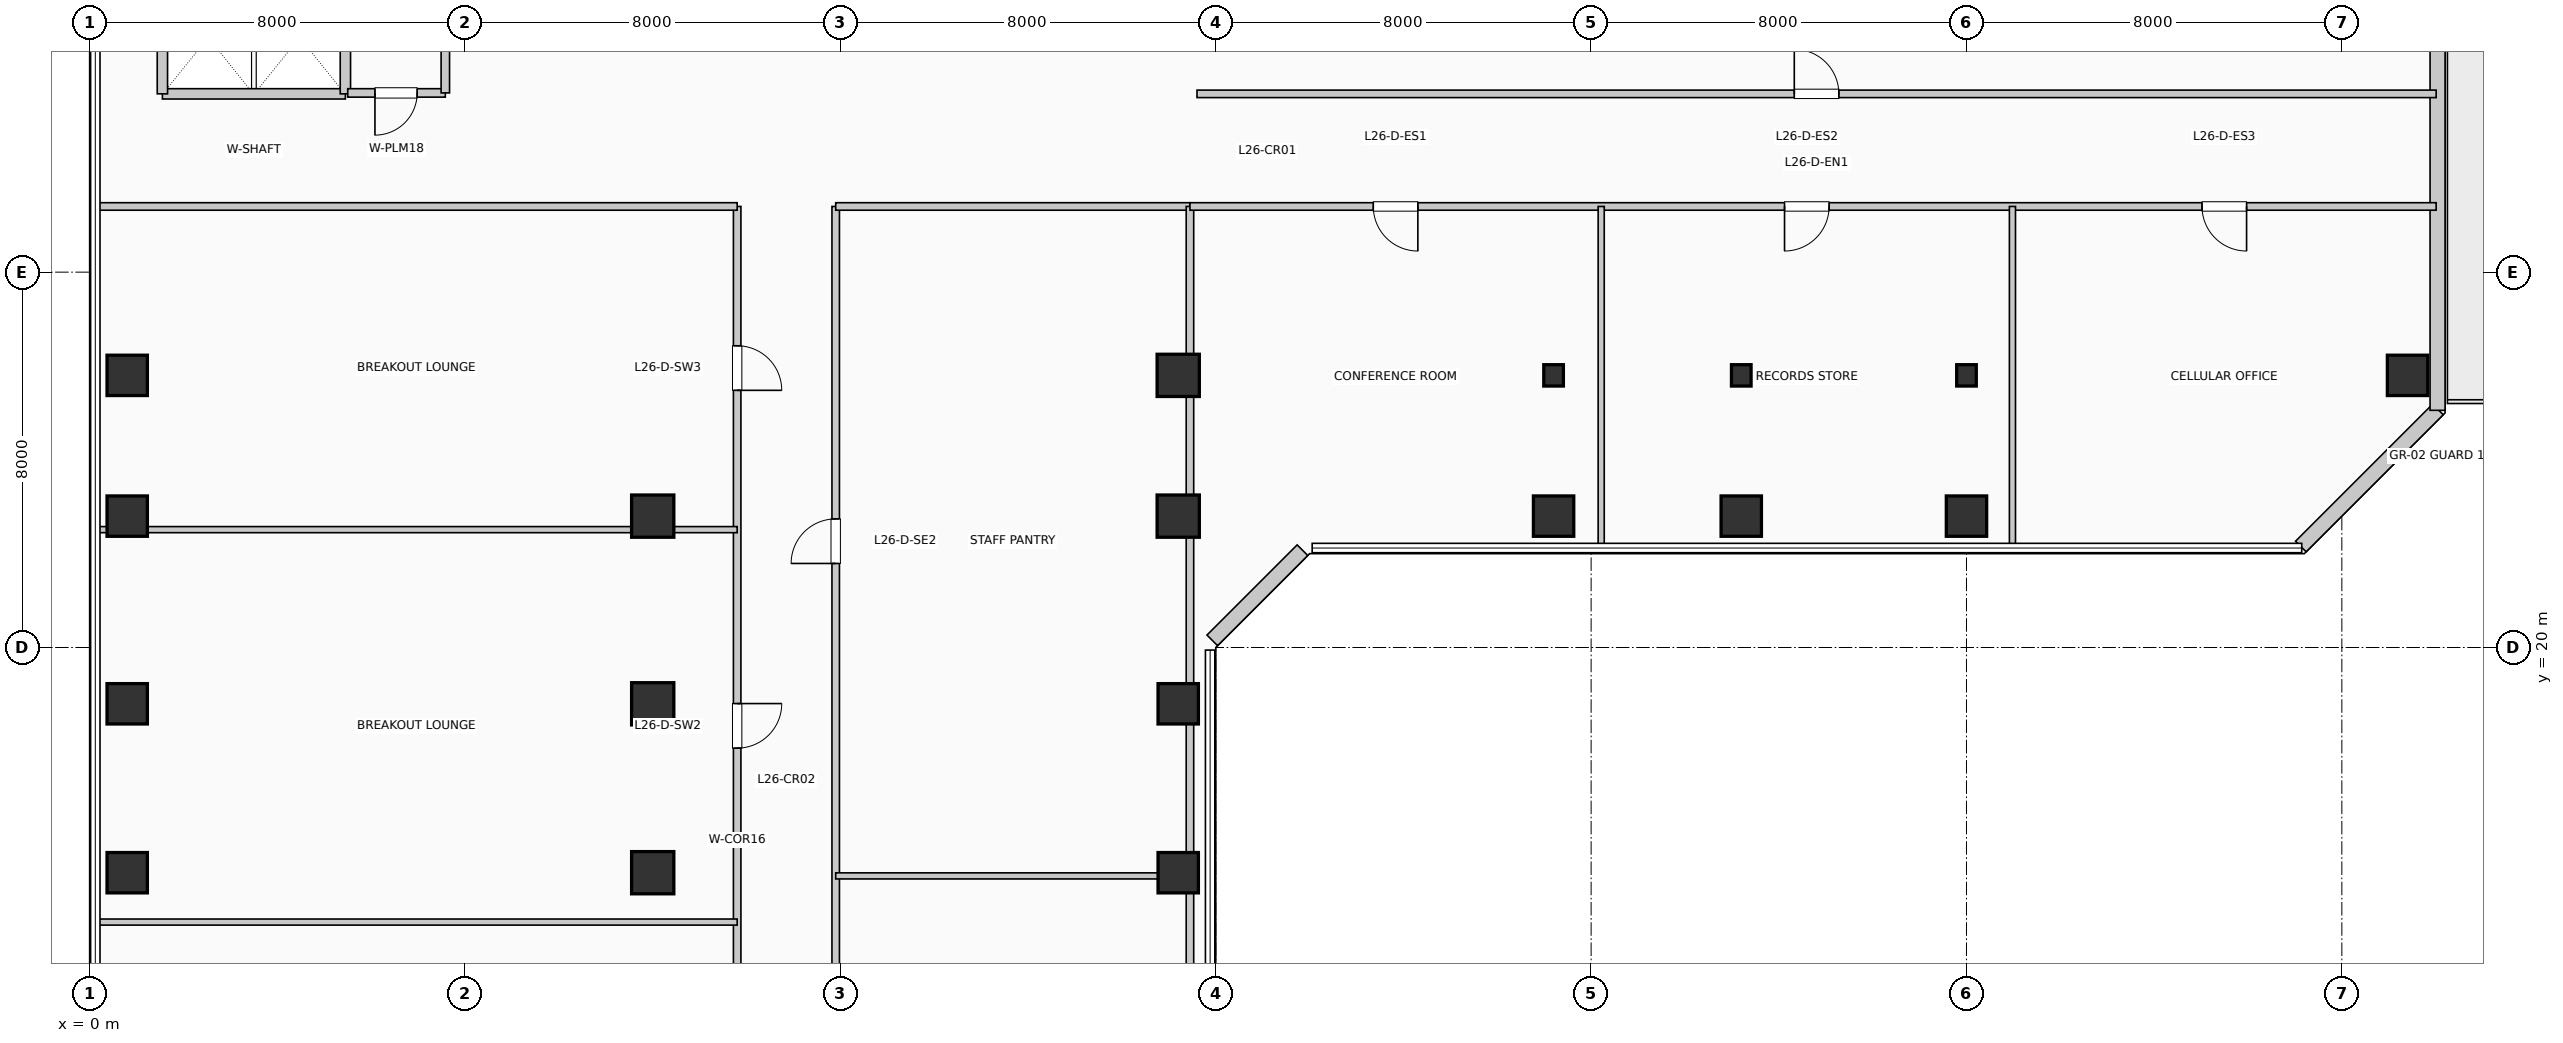
"""IFC4 building model, lengths in metres.
Left out: names, types, materials, properties, quantities, classifications, styles, units other than length and angle.
Written with IfcOpenShell. Run it as: python <this file> out.ifc"""

import sys

from ifc_helpers import new_model, si_unit, direction, frame, frame_2d, origin, origin_2d, place, context, subcontext, project, spatial, rectangle, i_section, extrude, element, fill, save


model = new_model("IFC4")
c1 = context("Model", 3, precision=1e-05, world=origin(), true_north=direction((0.0, 1.0)))
c2 = subcontext(c1, "Body", "Model", "MODEL_VIEW")
j1 = project(units=[si_unit("LENGTHUNIT", "METRE"), si_unit("PLANEANGLEUNIT", "RADIAN")], contexts=[c1])
p1 = place(None, origin())
s1 = spatial("IfcSite", under=j1, at=p1, CompositionType="ELEMENT")
p2 = place(p1, origin())
s2 = spatial("IfcBuilding", under=s1, at=p2, CompositionType="ELEMENT")
p3 = place(p2, frame((0.0, 0.0, 110.55)))
s3 = spatial("IfcBuildingStorey", under=s2, at=p3, CompositionType="ELEMENT", Elevation=110.55)
for number, where, z_axis, x_axis in (
    (1, (0.8, 15.2, 0.0), (0.0, 0.0, 1.0), (1.0, 0.0, 0.0)),
    (2, (0.8, 18.8, 0.0), (0.0, 0.0, 1.0), (1.0, 0.0, 0.0)),
    (3, (0.8, 22.8, 0.0), (0.0, 0.0, 1.0), (1.0, 0.0, 0.0)),
    (4, (0.8, 25.8, 0.0), (0.0, 0.0, 1.0), (1.0, 0.0, 0.0)),
):
    element("IfcColumn", number, at=place(p3, frame(where, z_axis=z_axis, x_axis=x_axis)), inside=s3, PredefinedType="COLUMN", context=c2, shape_type="SweptSolid", body=[
        extrude(rectangle(XDim=0.86, YDim=0.86, at=origin_2d()), origin(), (0.0, 0.0, 1.0), 3.96),
    ])
for number, where, z_axis, x_axis in (
    (5, (12.0, 15.2, 0.0), (0.0, 0.0, 1.0), (1.0, 0.0, 0.0)),
    (6, (12.0, 18.8, 0.0), (0.0, 0.0, 1.0), (1.0, 0.0, 0.0)),
    (7, (12.0, 22.8, 0.0), (0.0, 0.0, 1.0), (1.0, 0.0, 0.0)),
):
    element("IfcColumn", number, at=place(p3, frame(where, z_axis=z_axis, x_axis=x_axis)), inside=s3, PredefinedType="COLUMN", context=c2, shape_type="SweptSolid", body=[
        extrude(rectangle(XDim=0.9, YDim=0.9, at=origin_2d()), origin(), (0.0, 0.0, 1.0), 3.96),
    ])
for number, where, z_axis, x_axis in (
    (8, (23.2, 15.2, 0.0), (0.0, 0.0, 1.0), (1.0, 0.0, 0.0)),
    (9, (23.2, 18.8, 0.0), (0.0, 0.0, 1.0), (1.0, 0.0, 0.0)),
):
    element("IfcColumn", number, at=place(p3, frame(where, z_axis=z_axis, x_axis=x_axis)), inside=s3, PredefinedType="COLUMN", context=c2, shape_type="SweptSolid", body=[
        extrude(rectangle(XDim=0.86, YDim=0.86, at=origin_2d()), origin(), (0.0, 0.0, 1.0), 3.96),
    ])
for number, where, z_axis, x_axis in (
    (10, (23.2, 22.8, 0.0), (0.0, 0.0, 1.0), (1.0, 0.0, 0.0)),
    (11, (23.2, 25.8, 0.0), (0.0, 0.0, 1.0), (1.0, 0.0, 0.0)),
):
    element("IfcColumn", number, at=place(p3, frame(where, z_axis=z_axis, x_axis=x_axis)), inside=s3, PredefinedType="COLUMN", context=c2, shape_type="SweptSolid", body=[
        extrude(rectangle(XDim=0.9, YDim=0.9, at=origin_2d()), origin(), (0.0, 0.0, 1.0), 3.96),
    ])
p4 = place(p3, frame((31.2, 22.8, 0.0), z_axis=(0.0, 0.0, 1.0), x_axis=(1.0, 0.0, 0.0)))
e12 = element("IfcColumn", 12, at=p4, inside=s3, PredefinedType="COLUMN", context=c2, shape_type="SweptSolid", body=[
    extrude(rectangle(XDim=0.86, YDim=0.86, at=origin_2d()), origin(), (0.0, 0.0, 1.0), 3.96),
])
p5 = place(p3, frame((31.2, 25.8, 0.0), z_axis=(0.0, 0.0, 1.0), x_axis=(1.0, 0.0, 0.0)))
e13 = element("IfcColumn", 13, at=p5, inside=s3, PredefinedType="COLUMN", context=c2, shape_type="SweptSolid", body=[
    extrude(i_section(OverallWidth=0.418, OverallDepth=0.455, WebThickness=0.032, FlangeThickness=0.051, at=origin_2d()), origin(), (0.0, 0.0, 1.0), 3.96),
])
p6 = place(p3, frame((35.2, 22.8, 0.0), z_axis=(0.0, 0.0, 1.0), x_axis=(1.0, 0.0, 0.0)))
e14 = element("IfcColumn", 14, at=p6, inside=s3, PredefinedType="COLUMN", context=c2, shape_type="SweptSolid", body=[
    extrude(rectangle(XDim=0.86, YDim=0.86, at=origin_2d()), origin(), (0.0, 0.0, 1.0), 3.96),
])
p7 = place(p3, frame((35.2, 25.8, 0.0), z_axis=(0.0, 0.0, 1.0), x_axis=(1.0, 0.0, 0.0)))
e15 = element("IfcColumn", 15, at=p7, inside=s3, PredefinedType="COLUMN", context=c2, shape_type="SweptSolid", body=[
    extrude(i_section(OverallWidth=0.418, OverallDepth=0.455, WebThickness=0.032, FlangeThickness=0.051, at=origin_2d()), origin(), (0.0, 0.0, 1.0), 3.96),
])
p8 = place(p3, frame((40.0, 22.8, 0.0), z_axis=(0.0, 0.0, 1.0), x_axis=(1.0, 0.0, 0.0)))
e16 = element("IfcColumn", 16, at=p8, inside=s3, PredefinedType="COLUMN", context=c2, shape_type="SweptSolid", body=[
    extrude(rectangle(XDim=0.86, YDim=0.86, at=origin_2d()), origin(), (0.0, 0.0, 1.0), 3.96),
])
p9 = place(p3, frame((40.0, 25.8, 0.0), z_axis=(0.0, 0.0, 1.0), x_axis=(1.0, 0.0, 0.0)))
e17 = element("IfcColumn", 17, at=p9, inside=s3, PredefinedType="COLUMN", context=c2, shape_type="SweptSolid", body=[
    extrude(i_section(OverallWidth=0.418, OverallDepth=0.455, WebThickness=0.032, FlangeThickness=0.051, at=origin_2d()), origin(), (0.0, 0.0, 1.0), 3.96),
])
p10 = place(p3, frame((49.4, 25.8, 0.0), z_axis=(0.0, 0.0, 1.0), x_axis=(1.0, 0.0, 0.0)))
e18 = element("IfcColumn", 18, at=p10, inside=s3, PredefinedType="COLUMN", context=c2, shape_type="SweptSolid", body=[
    extrude(rectangle(XDim=0.86, YDim=0.86, at=origin_2d()), origin(), (0.0, 0.0, 1.0), 3.96),
])
p11 = place(p3, frame((23.926, 20.152, 0.0), z_axis=(0.0, 0.0, 1.0), x_axis=(0.707106781187, 0.707106781187, 0.0)))
e19 = element("IfcWall", 19, at=p11, inside=s3, PredefinedType="SOLIDWALL", context=c2, shape_type="SweptSolid", body=[
    extrude(rectangle(XDim=2.718, YDim=0.32, at=frame_2d((1.359, 0.0))), origin(), (0.0, 0.0, 1.0), 3.71),
])
p12 = place(p3, frame((47.126, 22.152, 0.0), z_axis=(0.0, 0.0, 1.0), x_axis=(0.707136318428, 0.707077242712, 0.0)))
e20 = element("IfcWall", 20, at=p12, inside=s3, PredefinedType="SOLIDWALL", context=c2, shape_type="SweptSolid", body=[
    extrude(rectangle(XDim=4.133, YDim=0.32, at=frame_2d((2.066, 0.0))), origin(), (0.0, 0.0, 1.0), 3.71),
])
p13 = place(p3, frame((50.04, 25.055, 0.0), z_axis=(0.0, 0.0, 1.0), x_axis=(0.0, 1.0, 0.0)))
e21 = element("IfcWall", 21, at=p13, inside=s3, PredefinedType="SOLIDWALL", context=c2, shape_type="SweptSolid", body=[
    extrude(rectangle(XDim=17.89, YDim=0.32, at=frame_2d((8.945, 0.0))), origin(), (0.0, 0.0, 1.0), 3.71),
])
p14 = place(p13, frame((13.381, 0.0, 0.0), z_axis=(0.0, 0.0, 1.0), x_axis=(-1.0, 0.0, 0.0)))
e22 = element("IfcOpeningElement", 22, at=p14, cuts=e21, PredefinedType="OPENING", context=c2, shape_type="SweptSolid", body=[
    extrude(rectangle(XDim=1.1, YDim=2.2, at=frame_2d((0.55, 1.1))), frame((0.0, 0.17, 0.0), z_axis=(0.0, -1.0, 0.0), x_axis=(1.0, 0.0, 0.0)), (0.0, 0.0, 1.0), 0.34),
])
p15 = place(p3, frame((1.55, 31.8, 0.0), z_axis=(0.0, 0.0, 1.0), x_axis=(1.0, 0.0, 0.0)))
e23 = element("IfcWall", 23, at=p15, inside=s3, PredefinedType="PARTITIONING", context=c2, shape_type="SweptSolid", body=[
    extrude(rectangle(XDim=3.9, YDim=0.22, at=frame_2d((1.95, 0.0))), origin(), (0.0, 0.0, 1.0), 3.71),
])
for number, where, z_axis, x_axis in (
    (24, (1.55, 31.8, 0.0), (0.0, 0.0, 1.0), (0.0, 1.0, 0.0)),
    (25, (5.45, 31.8, 0.0), (0.0, 0.0, 1.0), (0.0, 1.0, 0.0)),
):
    element("IfcWall", number, at=place(p3, frame(where, z_axis=z_axis, x_axis=x_axis)), inside=s3, PredefinedType="PARTITIONING", context=c2, shape_type="SweptSolid", body=[
        extrude(rectangle(XDim=2.38, YDim=0.22, at=frame_2d((1.19, 0.0))), origin(), (0.0, 0.0, 1.0), 3.71),
    ])
p16 = place(p3, frame((5.5, 31.82, 0.0), z_axis=(0.0, 0.0, 1.0), x_axis=(1.0, 0.0, 0.0)))
e26 = element("IfcWall", 26, at=p16, inside=s3, PredefinedType="PLUMBINGWALL", context=c2, shape_type="SweptSolid", body=[
    extrude(rectangle(XDim=2.08, YDim=0.18, at=frame_2d((1.04, 0.0))), origin(), (0.0, 0.0, 1.0), 3.71),
])
p17 = place(p16, frame((1.48, 0.0, 0.0), z_axis=(0.0, 0.0, 1.0), x_axis=(-1.0, 0.0, 0.0)))
e27 = element("IfcOpeningElement", 27, at=p17, cuts=e26, PredefinedType="OPENING", context=c2, shape_type="SweptSolid", body=[
    extrude(rectangle(XDim=0.9, YDim=2.1, at=frame_2d((0.45, 1.05))), frame((0.0, 0.1, 0.0), z_axis=(0.0, -1.0, 0.0), x_axis=(1.0, 0.0, 0.0)), (0.0, 0.0, 1.0), 0.2),
])
p18 = place(p3, frame((7.58, 31.82, 0.0), z_axis=(0.0, 0.0, 1.0), x_axis=(0.0, 1.0, 0.0)))
e28 = element("IfcWall", 28, at=p18, inside=s3, PredefinedType="PLUMBINGWALL", context=c2, shape_type="SweptSolid", body=[
    extrude(rectangle(XDim=2.36, YDim=0.18, at=frame_2d((1.18, 0.0))), origin(), (0.0, 0.0, 1.0), 3.71),
])
p19 = place(p3, frame((13.8, 4.8, 0.0), z_axis=(0.0, 0.0, 1.0), x_axis=(0.0, 1.0, 0.0)))
e29 = element("IfcWall", 29, at=p19, inside=s3, PredefinedType="PARTITIONING", context=c2, shape_type="SweptSolid", body=[
    extrude(rectangle(XDim=24.6, YDim=0.16, at=frame_2d((12.3, 0.0))), origin(), (0.0, 0.0, 1.0), 3.71),
])
p20 = place(p19, frame((5.149, 0.0, 0.0), z_axis=(0.0, 0.0, 1.0), x_axis=(-1.0, 0.0, 0.0)))
e30 = element("IfcOpeningElement", 30, at=p20, cuts=e29, PredefinedType="OPENING", context=c2, shape_type="SweptSolid", body=[
    extrude(rectangle(XDim=0.95, YDim=2.15, at=frame_2d((0.475, 1.075))), frame((0.0, 0.09, 0.0), z_axis=(0.0, -1.0, 0.0), x_axis=(1.0, 0.0, 0.0)), (0.0, 0.0, 1.0), 0.18),
])
p21 = place(p19, frame((14.005, 0.0, 0.0), z_axis=(0.0, 0.0, 1.0), x_axis=(-1.0, 0.0, 0.0)))
e31 = element("IfcOpeningElement", 31, at=p21, cuts=e29, PredefinedType="OPENING", context=c2, shape_type="SweptSolid", body=[
    extrude(rectangle(XDim=0.95, YDim=2.15, at=frame_2d((0.475, 1.075))), frame((0.0, 0.09, 0.0), z_axis=(0.0, -1.0, 0.0), x_axis=(1.0, 0.0, 0.0)), (0.0, 0.0, 1.0), 0.18),
])
p22 = place(p19, frame((21.631, 0.0, 0.0), z_axis=(0.0, 0.0, 1.0), x_axis=(-1.0, 0.0, 0.0)))
e32 = element("IfcOpeningElement", 32, at=p22, cuts=e29, PredefinedType="OPENING", context=c2, shape_type="SweptSolid", body=[
    extrude(rectangle(XDim=0.95, YDim=2.15, at=frame_2d((0.475, 1.075))), frame((0.0, 0.09, 0.0), z_axis=(0.0, -1.0, 0.0), x_axis=(1.0, 0.0, 0.0)), (0.0, 0.0, 1.0), 0.18),
])
p23 = place(p3, frame((15.9, 4.8, 0.0), z_axis=(0.0, 0.0, 1.0), x_axis=(0.0, 1.0, 0.0)))
e33 = element("IfcWall", 33, at=p23, inside=s3, PredefinedType="PARTITIONING", context=c2, shape_type="SweptSolid", body=[
    extrude(rectangle(XDim=24.6, YDim=0.16, at=frame_2d((12.3, 0.0))), origin(), (0.0, 0.0, 1.0), 3.71),
])
p24 = place(p23, frame((4.691, 0.0, 0.0)))
e34 = element("IfcOpeningElement", 34, at=p24, cuts=e33, PredefinedType="OPENING", context=c2, shape_type="SweptSolid", body=[
    extrude(rectangle(XDim=0.95, YDim=2.15, at=frame_2d((0.475, 1.075))), frame((0.0, 0.09, 0.0), z_axis=(0.0, -1.0, 0.0), x_axis=(1.0, 0.0, 0.0)), (0.0, 0.0, 1.0), 0.18),
])
p25 = place(p23, frame((16.991, 0.0, 0.0)))
e35 = element("IfcOpeningElement", 35, at=p25, cuts=e33, PredefinedType="OPENING", context=c2, shape_type="SweptSolid", body=[
    extrude(rectangle(XDim=0.95, YDim=2.15, at=frame_2d((0.475, 1.075))), frame((0.0, 0.09, 0.0), z_axis=(0.0, -1.0, 0.0), x_axis=(1.0, 0.0, 0.0)), (0.0, 0.0, 1.0), 0.18),
])
p26 = place(p3, frame((0.19, 29.4, 0.0), z_axis=(0.0, 0.0, 1.0), x_axis=(1.0, 0.0, 0.0)))
e36 = element("IfcWall", 36, at=p26, inside=s3, PredefinedType="PARTITIONING", context=c2, shape_type="SweptSolid", body=[
    extrude(rectangle(XDim=13.61, YDim=0.16, at=frame_2d((6.805, 0.0))), origin(), (0.0, 0.0, 1.0), 3.365),
])
p27 = place(p3, frame((15.9, 29.4, 0.0), z_axis=(0.0, 0.0, 1.0), x_axis=(1.0, 0.0, 0.0)))
e37 = element("IfcWall", 37, at=p27, inside=s3, PredefinedType="PARTITIONING", context=c2, shape_type="SweptSolid", body=[
    extrude(rectangle(XDim=7.55, YDim=0.16, at=frame_2d((3.775, 0.0))), origin(), (0.0, 0.0, 1.0), 3.71),
])
p28 = place(p3, frame((23.45, 0.19, 0.0), z_axis=(0.0, 0.0, 1.0), x_axis=(0.0, 1.0, 0.0)))
e38 = element("IfcWall", 38, at=p28, inside=s3, PredefinedType="PARTITIONING", context=c2, shape_type="SweptSolid", body=[
    extrude(rectangle(XDim=29.21, YDim=0.16, at=frame_2d((14.605, 0.0))), origin(), (0.0, 0.0, 1.0), 3.045),
])
p29 = place(p3, frame((0.19, 14.148, 0.0), z_axis=(0.0, 0.0, 1.0), x_axis=(1.0, 0.0, 0.0)))
e39 = element("IfcWall", 39, at=p29, inside=s3, PredefinedType="PARTITIONING", context=c2, shape_type="SweptSolid", body=[
    extrude(rectangle(XDim=13.61, YDim=0.13, at=frame_2d((6.805, 0.0))), origin(), (0.0, 0.0, 1.0), 3.71),
])
p30 = place(p3, frame((0.19, 22.512, 0.0), z_axis=(0.0, 0.0, 1.0), x_axis=(1.0, 0.0, 0.0)))
e40 = element("IfcWall", 40, at=p30, inside=s3, PredefinedType="PARTITIONING", context=c2, shape_type="SweptSolid", body=[
    extrude(rectangle(XDim=13.61, YDim=0.13, at=frame_2d((6.805, 0.0))), origin(), (0.0, 0.0, 1.0), 3.045),
])
p31 = place(p3, frame((15.9, 15.132, 0.0), z_axis=(0.0, 0.0, 1.0), x_axis=(1.0, 0.0, 0.0)))
e41 = element("IfcWall", 41, at=p31, inside=s3, PredefinedType="PARTITIONING", context=c2, shape_type="SweptSolid", body=[
    extrude(rectangle(XDim=7.55, YDim=0.13, at=frame_2d((3.775, 0.0))), origin(), (0.0, 0.0, 1.0), 3.045),
])
p32 = place(p3, frame((23.45, 29.4, 0.0), z_axis=(0.0, 0.0, 1.0), x_axis=(1.0, 0.0, 0.0)))
e42 = element("IfcWall", 42, at=p32, inside=s3, PredefinedType="PARTITIONING", context=c2, shape_type="SweptSolid", body=[
    extrude(rectangle(XDim=26.56, YDim=0.16, at=frame_2d((13.28, 0.0))), origin(), (0.0, 0.0, 1.0), 3.365),
])
p33 = place(p32, frame((4.857, 0.0, 0.0), z_axis=(0.0, 0.0, 1.0), x_axis=(-1.0, 0.0, 0.0)))
e43 = element("IfcOpeningElement", 43, at=p33, cuts=e42, PredefinedType="OPENING", context=c2, shape_type="SweptSolid", body=[
    extrude(rectangle(XDim=0.95, YDim=2.15, at=frame_2d((0.475, 1.075))), frame((0.0, 0.09, 0.0), z_axis=(0.0, -1.0, 0.0), x_axis=(1.0, 0.0, 0.0)), (0.0, 0.0, 1.0), 0.18),
])
p34 = place(p32, frame((13.622, 0.0, 0.0), z_axis=(0.0, 0.0, 1.0), x_axis=(-1.0, 0.0, 0.0)))
e44 = element("IfcOpeningElement", 44, at=p34, cuts=e42, PredefinedType="OPENING", context=c2, shape_type="SweptSolid", body=[
    extrude(rectangle(XDim=0.95, YDim=2.15, at=frame_2d((0.475, 1.075))), frame((0.0, 0.09, 0.0), z_axis=(0.0, -1.0, 0.0), x_axis=(1.0, 0.0, 0.0)), (0.0, 0.0, 1.0), 0.18),
])
p35 = place(p32, frame((22.52, 0.0, 0.0), z_axis=(0.0, 0.0, 1.0), x_axis=(-1.0, 0.0, 0.0)))
e45 = element("IfcOpeningElement", 45, at=p35, cuts=e42, PredefinedType="OPENING", context=c2, shape_type="SweptSolid", body=[
    extrude(rectangle(XDim=0.95, YDim=2.15, at=frame_2d((0.475, 1.075))), frame((0.0, 0.09, 0.0), z_axis=(0.0, -1.0, 0.0), x_axis=(1.0, 0.0, 0.0)), (0.0, 0.0, 1.0), 0.18),
])
p36 = place(p3, frame((23.6, 31.8, 0.0), z_axis=(0.0, 0.0, 1.0), x_axis=(1.0, 0.0, 0.0)))
e46 = element("IfcWall", 46, at=p36, inside=s3, PredefinedType="PARTITIONING", context=c2, shape_type="SweptSolid", body=[
    extrude(rectangle(XDim=26.41, YDim=0.16, at=frame_2d((13.205, 0.0))), origin(), (0.0, 0.0, 1.0), 3.71),
])
p37 = place(p36, frame((12.73, 0.0, 0.0)))
e47 = element("IfcOpeningElement", 47, at=p37, cuts=e46, PredefinedType="OPENING", context=c2, shape_type="SweptSolid", body=[
    extrude(rectangle(XDim=0.95, YDim=2.15, at=frame_2d((0.475, 1.075))), frame((0.0, 0.09, 0.0), z_axis=(0.0, -1.0, 0.0), x_axis=(1.0, 0.0, 0.0)), (0.0, 0.0, 1.0), 0.18),
])
for number, where, z_axis, x_axis in (
    (48, (32.215, 22.19, 0.0), (0.0, 0.0, 1.0), (0.0, 1.0, 0.0)),
    (49, (40.979, 22.19, 0.0), (0.0, 0.0, 1.0), (0.0, 1.0, 0.0)),
):
    element("IfcWall", number, at=place(p3, frame(where, z_axis=z_axis, x_axis=x_axis)), inside=s3, PredefinedType="PARTITIONING", context=c2, shape_type="SweptSolid", body=[
        extrude(rectangle(XDim=7.21, YDim=0.13, at=frame_2d((3.605, 0.0))), origin(), (0.0, 0.0, 1.0), 3.71),
    ])
p38 = place(p17, origin())
e50 = element("IfcDoor", 50, at=p38, inside=s3, OperationType="SINGLE_SWING_LEFT", PredefinedType="DOOR", context=c2, shape_type="SweptSolid", body=[
    extrude(rectangle(XDim=0.9, YDim=2.1, at=frame_2d((0.45, 1.05))), frame((0.0, 0.025, 0.0), z_axis=(0.0, -1.0, 0.0), x_axis=(1.0, 0.0, 0.0)), (0.0, 0.0, 1.0), 0.05),
])
fill(e27, e50)
p39 = place(p21, origin())
e51 = element("IfcDoor", 51, at=p39, inside=s3, OperationType="SINGLE_SWING_RIGHT", PredefinedType="DOOR", context=c2, shape_type="SweptSolid", body=[
    extrude(rectangle(XDim=0.95, YDim=2.15, at=frame_2d((0.475, 1.075))), frame((0.0, 0.025, 0.0), z_axis=(0.0, -1.0, 0.0), x_axis=(1.0, 0.0, 0.0)), (0.0, 0.0, 1.0), 0.05),
])
fill(e31, e51)
p40 = place(p22, origin())
e52 = element("IfcDoor", 52, at=p40, inside=s3, OperationType="SINGLE_SWING_LEFT", PredefinedType="DOOR", context=c2, shape_type="SweptSolid", body=[
    extrude(rectangle(XDim=0.95, YDim=2.15, at=frame_2d((0.475, 1.075))), frame((0.0, 0.025, 0.0), z_axis=(0.0, -1.0, 0.0), x_axis=(1.0, 0.0, 0.0)), (0.0, 0.0, 1.0), 0.05),
])
fill(e32, e52)
p41 = place(p25, origin())
e53 = element("IfcDoor", 53, at=p41, inside=s3, OperationType="SINGLE_SWING_LEFT", PredefinedType="DOOR", context=c2, shape_type="SweptSolid", body=[
    extrude(rectangle(XDim=0.95, YDim=2.15, at=frame_2d((0.475, 1.075))), frame((0.0, 0.025, 0.0), z_axis=(0.0, -1.0, 0.0), x_axis=(1.0, 0.0, 0.0)), (0.0, 0.0, 1.0), 0.05),
])
fill(e35, e53)
p42 = place(p33, origin())
e54 = element("IfcDoor", 54, at=p42, inside=s3, OperationType="SINGLE_SWING_RIGHT", PredefinedType="DOOR", context=c2, shape_type="SweptSolid", body=[
    extrude(rectangle(XDim=0.95, YDim=2.15, at=frame_2d((0.475, 1.075))), frame((0.0, 0.025, 0.0), z_axis=(0.0, -1.0, 0.0), x_axis=(1.0, 0.0, 0.0)), (0.0, 0.0, 1.0), 0.05),
])
fill(e43, e54)
p43 = place(p34, origin())
e55 = element("IfcDoor", 55, at=p43, inside=s3, OperationType="SINGLE_SWING_LEFT", PredefinedType="DOOR", context=c2, shape_type="SweptSolid", body=[
    extrude(rectangle(XDim=0.95, YDim=2.15, at=frame_2d((0.475, 1.075))), frame((0.0, 0.025, 0.0), z_axis=(0.0, -1.0, 0.0), x_axis=(1.0, 0.0, 0.0)), (0.0, 0.0, 1.0), 0.05),
])
fill(e44, e55)
p44 = place(p35, origin())
e56 = element("IfcDoor", 56, at=p44, inside=s3, OperationType="SINGLE_SWING_RIGHT", PredefinedType="DOOR", context=c2, shape_type="SweptSolid", body=[
    extrude(rectangle(XDim=0.95, YDim=2.15, at=frame_2d((0.475, 1.075))), frame((0.0, 0.025, 0.0), z_axis=(0.0, -1.0, 0.0), x_axis=(1.0, 0.0, 0.0)), (0.0, 0.0, 1.0), 0.05),
])
fill(e45, e56)
p45 = place(p37, origin())
e57 = element("IfcDoor", 57, at=p45, inside=s3, OperationType="SINGLE_SWING_LEFT", PredefinedType="DOOR", context=c2, shape_type="SweptSolid", body=[
    extrude(rectangle(XDim=0.95, YDim=2.15, at=frame_2d((0.475, 1.075))), frame((0.0, 0.025, 0.0), z_axis=(0.0, -1.0, 0.0), x_axis=(1.0, 0.0, 0.0)), (0.0, 0.0, 1.0), 0.05),
])
fill(e47, e57)
save(model, sys.argv[1])
